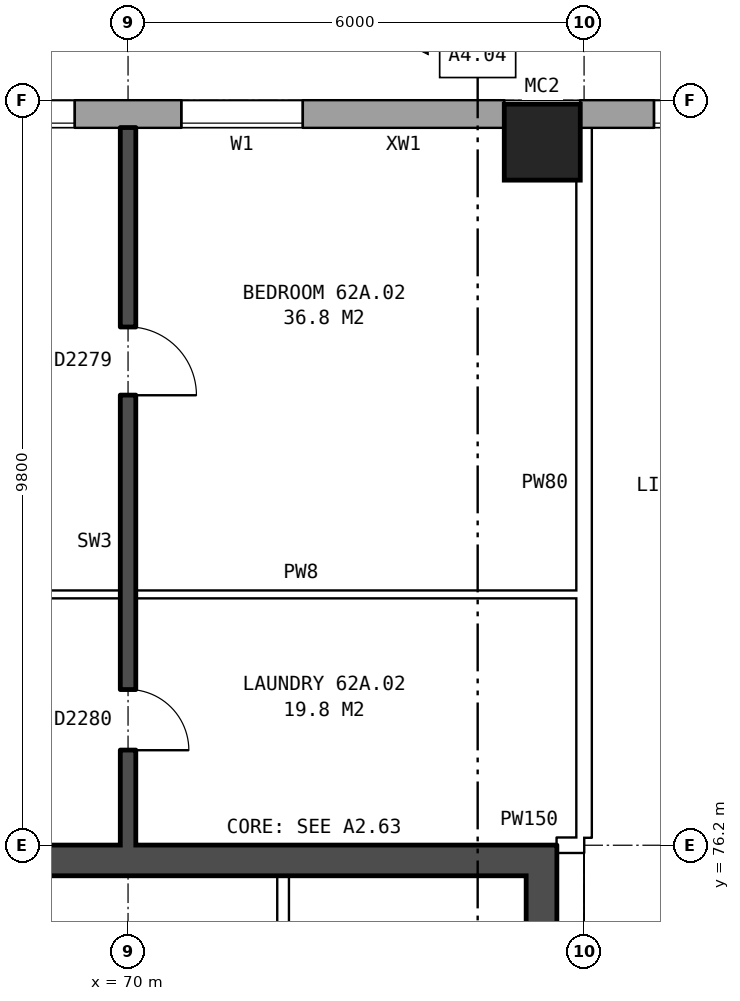
"""IFC4 building model, lengths in metres.
Left out: names, types, materials, properties, quantities, classifications, styles, units other than length and angle.
Written with IfcOpenShell. Run it as: python <this file> out.ifc"""

import sys

from ifc_helpers import new_model, si_unit, direction, frame, frame_2d, origin, origin_2d, place, context, subcontext, project, spatial, rectangle, hollow_rectangle, extrude, element, fill, save


model = new_model("IFC4")
c1 = context("Model", 3, precision=1e-05, world=origin(), true_north=direction((0.0, 1.0)))
c2 = subcontext(c1, "Body", "Model", "MODEL_VIEW")
j1 = project(units=[si_unit("LENGTHUNIT", "METRE"), si_unit("PLANEANGLEUNIT", "RADIAN")], contexts=[c1])
p1 = place(None, origin())
s1 = spatial("IfcSite", under=j1, at=p1, CompositionType="ELEMENT")
p2 = place(p1, origin())
s2 = spatial("IfcBuilding", under=s1, at=p2, CompositionType="ELEMENT")
p3 = place(p2, frame((0.0, 0.0, 221.4)))
s3 = spatial("IfcBuildingStorey", under=s2, at=p3, CompositionType="ELEMENT", Elevation=221.4)
p4 = place(p3, frame((75.45, 85.45, 0.0), z_axis=(0.0, 0.0, 1.0), x_axis=(1.0, 0.0, 0.0)))
e1 = element("IfcColumn", 1, at=p4, inside=s3, PredefinedType="COLUMN", context=c2, shape_type="SweptSolid", body=[
    extrude(hollow_rectangle(XDim=1.0, YDim=1.0, WallThickness=0.055, at=origin_2d()), origin(), (0.0, 0.0, 1.0), 3.1),
])
p5 = place(p3, frame((131.05, 85.82, 0.0), z_axis=(0.0, 0.0, 1.0), x_axis=(-1.0, 0.0, 0.0)))
e2 = element("IfcWall", 2, at=p5, inside=s3, PredefinedType="STANDARD", context=c2, shape_type="SweptSolid", body=[
    extrude(rectangle(XDim=55.1, YDim=0.36, at=frame_2d((27.55, 0.0))), origin(), (0.0, 0.0, 1.0), 2.85),
])
p6 = place(p5, frame((0.969, 0.0, 0.8)))
e3 = element("IfcOpeningElement", 3, at=p6, cuts=e2, PredefinedType="OPENING", context=c2, shape_type="SweptSolid", body=[
    extrude(rectangle(XDim=1.6, YDim=1.8, at=frame_2d((0.8, 0.9))), frame((0.0, 0.19, 0.0), z_axis=(0.0, -1.0, 0.0), x_axis=(1.0, 0.0, 0.0)), (0.0, 0.0, 1.0), 0.38),
])
p7 = place(p5, frame((4.406, 0.0, 0.8)))
e4 = element("IfcOpeningElement", 4, at=p7, cuts=e2, PredefinedType="OPENING", context=c2, shape_type="SweptSolid", body=[
    extrude(rectangle(XDim=1.6, YDim=1.8, at=frame_2d((0.8, 0.9))), frame((0.0, 0.19, 0.0), z_axis=(0.0, -1.0, 0.0), x_axis=(1.0, 0.0, 0.0)), (0.0, 0.0, 1.0), 0.38),
])
p8 = place(p5, frame((7.844, 0.0, 0.8)))
e5 = element("IfcOpeningElement", 5, at=p8, cuts=e2, PredefinedType="OPENING", context=c2, shape_type="SweptSolid", body=[
    extrude(rectangle(XDim=1.6, YDim=1.8, at=frame_2d((0.8, 0.9))), frame((0.0, 0.19, 0.0), z_axis=(0.0, -1.0, 0.0), x_axis=(1.0, 0.0, 0.0)), (0.0, 0.0, 1.0), 0.38),
])
p9 = place(p5, frame((11.281, 0.0, 0.8)))
e6 = element("IfcOpeningElement", 6, at=p9, cuts=e2, PredefinedType="OPENING", context=c2, shape_type="SweptSolid", body=[
    extrude(rectangle(XDim=1.6, YDim=1.8, at=frame_2d((0.8, 0.9))), frame((0.0, 0.19, 0.0), z_axis=(0.0, -1.0, 0.0), x_axis=(1.0, 0.0, 0.0)), (0.0, 0.0, 1.0), 0.38),
])
p10 = place(p5, frame((14.719, 0.0, 0.8)))
e7 = element("IfcOpeningElement", 7, at=p10, cuts=e2, PredefinedType="OPENING", context=c2, shape_type="SweptSolid", body=[
    extrude(rectangle(XDim=1.6, YDim=1.8, at=frame_2d((0.8, 0.9))), frame((0.0, 0.19, 0.0), z_axis=(0.0, -1.0, 0.0), x_axis=(1.0, 0.0, 0.0)), (0.0, 0.0, 1.0), 0.38),
])
p11 = place(p5, frame((18.156, 0.0, 0.8)))
e8 = element("IfcOpeningElement", 8, at=p11, cuts=e2, PredefinedType="OPENING", context=c2, shape_type="SweptSolid", body=[
    extrude(rectangle(XDim=1.6, YDim=1.8, at=frame_2d((0.8, 0.9))), frame((0.0, 0.19, 0.0), z_axis=(0.0, -1.0, 0.0), x_axis=(1.0, 0.0, 0.0)), (0.0, 0.0, 1.0), 0.38),
])
p12 = place(p5, frame((21.594, 0.0, 0.8)))
e9 = element("IfcOpeningElement", 9, at=p12, cuts=e2, PredefinedType="OPENING", context=c2, shape_type="SweptSolid", body=[
    extrude(rectangle(XDim=1.6, YDim=1.8, at=frame_2d((0.8, 0.9))), frame((0.0, 0.19, 0.0), z_axis=(0.0, -1.0, 0.0), x_axis=(1.0, 0.0, 0.0)), (0.0, 0.0, 1.0), 0.38),
])
p13 = place(p5, frame((25.031, 0.0, 0.8)))
e10 = element("IfcOpeningElement", 10, at=p13, cuts=e2, PredefinedType="OPENING", context=c2, shape_type="SweptSolid", body=[
    extrude(rectangle(XDim=1.6, YDim=1.8, at=frame_2d((0.8, 0.9))), frame((0.0, 0.19, 0.0), z_axis=(0.0, -1.0, 0.0), x_axis=(1.0, 0.0, 0.0)), (0.0, 0.0, 1.0), 0.38),
])
p14 = place(p5, frame((28.469, 0.0, 0.8)))
e11 = element("IfcOpeningElement", 11, at=p14, cuts=e2, PredefinedType="OPENING", context=c2, shape_type="SweptSolid", body=[
    extrude(rectangle(XDim=1.6, YDim=1.8, at=frame_2d((0.8, 0.9))), frame((0.0, 0.19, 0.0), z_axis=(0.0, -1.0, 0.0), x_axis=(1.0, 0.0, 0.0)), (0.0, 0.0, 1.0), 0.38),
])
p15 = place(p5, frame((31.906, 0.0, 0.8)))
e12 = element("IfcOpeningElement", 12, at=p15, cuts=e2, PredefinedType="OPENING", context=c2, shape_type="SweptSolid", body=[
    extrude(rectangle(XDim=1.6, YDim=1.8, at=frame_2d((0.8, 0.9))), frame((0.0, 0.19, 0.0), z_axis=(0.0, -1.0, 0.0), x_axis=(1.0, 0.0, 0.0)), (0.0, 0.0, 1.0), 0.38),
])
p16 = place(p5, frame((35.344, 0.0, 0.8)))
e13 = element("IfcOpeningElement", 13, at=p16, cuts=e2, PredefinedType="OPENING", context=c2, shape_type="SweptSolid", body=[
    extrude(rectangle(XDim=1.6, YDim=1.8, at=frame_2d((0.8, 0.9))), frame((0.0, 0.19, 0.0), z_axis=(0.0, -1.0, 0.0), x_axis=(1.0, 0.0, 0.0)), (0.0, 0.0, 1.0), 0.38),
])
p17 = place(p5, frame((38.781, 0.0, 0.8)))
e14 = element("IfcOpeningElement", 14, at=p17, cuts=e2, PredefinedType="OPENING", context=c2, shape_type="SweptSolid", body=[
    extrude(rectangle(XDim=1.6, YDim=1.8, at=frame_2d((0.8, 0.9))), frame((0.0, 0.19, 0.0), z_axis=(0.0, -1.0, 0.0), x_axis=(1.0, 0.0, 0.0)), (0.0, 0.0, 1.0), 0.38),
])
p18 = place(p5, frame((42.219, 0.0, 0.8)))
e15 = element("IfcOpeningElement", 15, at=p18, cuts=e2, PredefinedType="OPENING", context=c2, shape_type="SweptSolid", body=[
    extrude(rectangle(XDim=1.6, YDim=1.8, at=frame_2d((0.8, 0.9))), frame((0.0, 0.19, 0.0), z_axis=(0.0, -1.0, 0.0), x_axis=(1.0, 0.0, 0.0)), (0.0, 0.0, 1.0), 0.38),
])
p19 = place(p5, frame((45.656, 0.0, 0.8)))
e16 = element("IfcOpeningElement", 16, at=p19, cuts=e2, PredefinedType="OPENING", context=c2, shape_type="SweptSolid", body=[
    extrude(rectangle(XDim=1.6, YDim=1.8, at=frame_2d((0.8, 0.9))), frame((0.0, 0.19, 0.0), z_axis=(0.0, -1.0, 0.0), x_axis=(1.0, 0.0, 0.0)), (0.0, 0.0, 1.0), 0.38),
])
p20 = place(p5, frame((49.094, 0.0, 0.8)))
e17 = element("IfcOpeningElement", 17, at=p20, cuts=e2, PredefinedType="OPENING", context=c2, shape_type="SweptSolid", body=[
    extrude(rectangle(XDim=1.6, YDim=1.8, at=frame_2d((0.8, 0.9))), frame((0.0, 0.19, 0.0), z_axis=(0.0, -1.0, 0.0), x_axis=(1.0, 0.0, 0.0)), (0.0, 0.0, 1.0), 0.38),
])
p21 = place(p5, frame((52.531, 0.0, 0.8)))
e18 = element("IfcOpeningElement", 18, at=p21, cuts=e2, PredefinedType="OPENING", context=c2, shape_type="SweptSolid", body=[
    extrude(rectangle(XDim=1.6, YDim=1.8, at=frame_2d((0.8, 0.9))), frame((0.0, 0.19, 0.0), z_axis=(0.0, -1.0, 0.0), x_axis=(1.0, 0.0, 0.0)), (0.0, 0.0, 1.0), 0.38),
])
p22 = place(p3, frame((74.95, 85.82, 0.0), z_axis=(0.0, 0.0, 1.0), x_axis=(-1.0, 0.0, 0.0)))
e19 = element("IfcWall", 19, at=p22, inside=s3, PredefinedType="STANDARD", context=c2, shape_type="SweptSolid", body=[
    extrude(rectangle(XDim=39.875, YDim=0.36, at=frame_2d((19.938, 0.0))), origin(), (0.0, 0.0, 1.0), 2.85),
])
p23 = place(p22, frame((2.65, 0.0, 0.8)))
e20 = element("IfcOpeningElement", 20, at=p23, cuts=e19, PredefinedType="OPENING", context=c2, shape_type="SweptSolid", body=[
    extrude(rectangle(XDim=1.6, YDim=1.8, at=frame_2d((0.8, 0.9))), frame((0.0, 0.19, 0.0), z_axis=(0.0, -1.0, 0.0), x_axis=(1.0, 0.0, 0.0)), (0.0, 0.0, 1.0), 0.38),
])
p24 = place(p22, frame((5.65, 0.0, 0.8)))
e21 = element("IfcOpeningElement", 21, at=p24, cuts=e19, PredefinedType="OPENING", context=c2, shape_type="SweptSolid", body=[
    extrude(rectangle(XDim=1.6, YDim=1.8, at=frame_2d((0.8, 0.9))), frame((0.0, 0.19, 0.0), z_axis=(0.0, -1.0, 0.0), x_axis=(1.0, 0.0, 0.0)), (0.0, 0.0, 1.0), 0.38),
])
p25 = place(p22, frame((8.65, 0.0, 0.8)))
e22 = element("IfcOpeningElement", 22, at=p25, cuts=e19, PredefinedType="OPENING", context=c2, shape_type="SweptSolid", body=[
    extrude(rectangle(XDim=1.6, YDim=1.8, at=frame_2d((0.8, 0.9))), frame((0.0, 0.19, 0.0), z_axis=(0.0, -1.0, 0.0), x_axis=(1.0, 0.0, 0.0)), (0.0, 0.0, 1.0), 0.38),
])
p26 = place(p22, frame((11.15, 0.0, 1.55)))
e23 = element("IfcOpeningElement", 23, at=p26, cuts=e19, PredefinedType="OPENING", context=c2, shape_type="SweptSolid", body=[
    extrude(rectangle(XDim=0.6, YDim=0.9, at=frame_2d((0.3, 0.45))), frame((0.0, 0.19, 0.0), z_axis=(0.0, -1.0, 0.0), x_axis=(1.0, 0.0, 0.0)), (0.0, 0.0, 1.0), 0.38),
])
p27 = place(p22, frame((14.65, 0.0, 0.8)))
e24 = element("IfcOpeningElement", 24, at=p27, cuts=e19, PredefinedType="OPENING", context=c2, shape_type="SweptSolid", body=[
    extrude(rectangle(XDim=1.6, YDim=1.8, at=frame_2d((0.8, 0.9))), frame((0.0, 0.19, 0.0), z_axis=(0.0, -1.0, 0.0), x_axis=(1.0, 0.0, 0.0)), (0.0, 0.0, 1.0), 0.38),
])
p28 = place(p22, frame((17.65, 0.0, 0.8)))
e25 = element("IfcOpeningElement", 25, at=p28, cuts=e19, PredefinedType="OPENING", context=c2, shape_type="SweptSolid", body=[
    extrude(rectangle(XDim=1.6, YDim=1.8, at=frame_2d((0.8, 0.9))), frame((0.0, 0.19, 0.0), z_axis=(0.0, -1.0, 0.0), x_axis=(1.0, 0.0, 0.0)), (0.0, 0.0, 1.0), 0.38),
])
p29 = place(p22, frame((20.65, 0.0, 0.8)))
e26 = element("IfcOpeningElement", 26, at=p29, cuts=e19, PredefinedType="OPENING", context=c2, shape_type="SweptSolid", body=[
    extrude(rectangle(XDim=1.6, YDim=1.8, at=frame_2d((0.8, 0.9))), frame((0.0, 0.19, 0.0), z_axis=(0.0, -1.0, 0.0), x_axis=(1.0, 0.0, 0.0)), (0.0, 0.0, 1.0), 0.38),
])
p30 = place(p22, frame((23.65, 0.0, 0.8)))
e27 = element("IfcOpeningElement", 27, at=p30, cuts=e19, PredefinedType="OPENING", context=c2, shape_type="SweptSolid", body=[
    extrude(rectangle(XDim=1.6, YDim=1.8, at=frame_2d((0.8, 0.9))), frame((0.0, 0.19, 0.0), z_axis=(0.0, -1.0, 0.0), x_axis=(1.0, 0.0, 0.0)), (0.0, 0.0, 1.0), 0.38),
])
p31 = place(p22, frame((26.65, 0.0, 0.8)))
e28 = element("IfcOpeningElement", 28, at=p31, cuts=e19, PredefinedType="OPENING", context=c2, shape_type="SweptSolid", body=[
    extrude(rectangle(XDim=1.6, YDim=1.8, at=frame_2d((0.8, 0.9))), frame((0.0, 0.19, 0.0), z_axis=(0.0, -1.0, 0.0), x_axis=(1.0, 0.0, 0.0)), (0.0, 0.0, 1.0), 0.38),
])
p32 = place(p22, frame((30.05, 0.0, 1.7)))
e29 = element("IfcOpeningElement", 29, at=p32, cuts=e19, PredefinedType="OPENING", context=c2, shape_type="SweptSolid", body=[
    extrude(rectangle(XDim=0.6, YDim=0.9, at=frame_2d((0.3, 0.45))), frame((0.0, 0.19, 0.0), z_axis=(0.0, -1.0, 0.0), x_axis=(1.0, 0.0, 0.0)), (0.0, 0.0, 1.0), 0.38),
])
p33 = place(p22, frame((32.65, 0.0, 0.8)))
e30 = element("IfcOpeningElement", 30, at=p33, cuts=e19, PredefinedType="OPENING", context=c2, shape_type="SweptSolid", body=[
    extrude(rectangle(XDim=1.6, YDim=1.8, at=frame_2d((0.8, 0.9))), frame((0.0, 0.19, 0.0), z_axis=(0.0, -1.0, 0.0), x_axis=(1.0, 0.0, 0.0)), (0.0, 0.0, 1.0), 0.38),
])
p34 = place(p22, frame((35.65, 0.0, 0.8)))
e31 = element("IfcOpeningElement", 31, at=p34, cuts=e19, PredefinedType="OPENING", context=c2, shape_type="SweptSolid", body=[
    extrude(rectangle(XDim=1.6, YDim=1.8, at=frame_2d((0.8, 0.9))), frame((0.0, 0.19, 0.0), z_axis=(0.0, -1.0, 0.0), x_axis=(1.0, 0.0, 0.0)), (0.0, 0.0, 1.0), 0.38),
])
p35 = place(p22, frame((13.0, 0.0, 0.15)))
e32 = element("IfcOpeningElement", 32, at=p35, cuts=e19, PredefinedType="OPENING", context=c2, shape_type="SweptSolid", body=[
    extrude(rectangle(XDim=0.8, YDim=1.5, at=frame_2d((0.4, 0.75))), frame((0.0, 0.19, 0.0), z_axis=(0.0, -1.0, 0.0), x_axis=(1.0, 0.0, 0.0)), (0.0, 0.0, 1.0), 0.38),
])
p36 = place(p22, frame((30.95, 0.0, 0.8)))
e33 = element("IfcOpeningElement", 33, at=p36, cuts=e19, PredefinedType="OPENING", context=c2, shape_type="SweptSolid", body=[
    extrude(rectangle(XDim=1.4, YDim=1.8, at=frame_2d((0.7, 0.9))), frame((0.0, 0.19, 0.0), z_axis=(0.0, -1.0, 0.0), x_axis=(1.0, 0.0, 0.0)), (0.0, 0.0, 1.0), 0.38),
])
p37 = place(p3, frame((75.44, 63.8, 0.0), z_axis=(0.0, 0.0, 1.0), x_axis=(0.0, 1.0, 0.0)))
e34 = element("IfcWall", 34, at=p37, inside=s3, PredefinedType="SHEAR", context=c2, shape_type="SweptSolid", body=[
    extrude(rectangle(XDim=12.4, YDim=0.4, at=frame_2d((6.2, 0.0))), origin(), (0.0, 0.0, 1.0), 2.85),
])
p38 = place(p37, frame((9.8, 0.0, 0.0)))
e35 = element("IfcOpeningElement", 35, at=p38, cuts=e34, PredefinedType="OPENING", context=c2, shape_type="SweptSolid", body=[
    extrude(rectangle(XDim=1.1, YDim=2.1, at=frame_2d((0.55, 1.05))), frame((0.0, 0.21, 0.0), z_axis=(0.0, -1.0, 0.0), x_axis=(1.0, 0.0, 0.0)), (0.0, 0.0, 1.0), 0.42),
])
p39 = place(p3, frame((67.04, 76.0, 0.0), z_axis=(0.0, 0.0, 1.0), x_axis=(1.0, 0.0, 0.0)))
e36 = element("IfcWall", 36, at=p39, inside=s3, PredefinedType="SHEAR", context=c2, shape_type="SweptSolid", body=[
    extrude(rectangle(XDim=8.2, YDim=0.4, at=frame_2d((4.1, 0.0))), origin(), (0.0, 0.0, 1.0), 2.85),
])
p40 = place(p3, frame((72.04, 73.45, 0.0), z_axis=(0.0, 0.0, 1.0), x_axis=(0.0, 1.0, 0.0)))
e37 = element("IfcWall", 37, at=p40, inside=s3, PredefinedType="PARTITIONING", context=c2, shape_type="SweptSolid", body=[
    extrude(rectangle(XDim=2.35, YDim=0.15, at=frame_2d((1.175, 0.0))), origin(), (0.0, 0.0, 1.0), 2.85),
])
p41 = place(p40, frame((0.75, 0.0, 0.0)))
e38 = element("IfcOpeningElement", 38, at=p41, cuts=e37, PredefinedType="OPENING", context=c2, shape_type="SweptSolid", body=[
    extrude(rectangle(XDim=0.85, YDim=2.1, at=frame_2d((0.425, 1.05))), frame((0.0, 0.085, 0.0), z_axis=(0.0, -1.0, 0.0), x_axis=(1.0, 0.0, 0.0)), (0.0, 0.0, 1.0), 0.17),
])
p42 = place(p3, frame((75.64, 76.2, 0.0), z_axis=(0.0, 0.0, 1.0), x_axis=(1.0, 0.0, 0.0)))
e39 = element("IfcWall", 39, at=p42, inside=s3, PredefinedType="PARTITIONING", context=c2, shape_type="SweptSolid", body=[
    extrude(rectangle(XDim=0.36, YDim=0.2, at=frame_2d((0.18, 0.0))), origin(), (0.0, 0.0, 1.0), 2.85),
])
p43 = place(p3, frame((64.1, 79.5, 0.0), z_axis=(0.0, 0.0, 1.0), x_axis=(1.0, 0.0, 0.0)))
e40 = element("IfcWall", 40, at=p43, inside=s3, PredefinedType="PARTITIONING", context=c2, shape_type="SweptSolid", body=[
    extrude(rectangle(XDim=11.8, YDim=0.1, at=frame_2d((5.9, 0.0))), origin(), (0.0, 0.0, 1.0), 2.85),
])
p44 = place(p43, frame((3.65, 0.0, 0.0)))
e41 = element("IfcOpeningElement", 41, at=p44, cuts=e40, PredefinedType="OPENING", context=c2, shape_type="SweptSolid", body=[
    extrude(rectangle(XDim=0.9, YDim=2.1, at=frame_2d((0.45, 1.05))), frame((0.0, 0.06, 0.0), z_axis=(0.0, -1.0, 0.0), x_axis=(1.0, 0.0, 0.0)), (0.0, 0.0, 1.0), 0.12),
])
p45 = place(p43, frame((0.7, 0.0, 0.0)))
e42 = element("IfcOpeningElement", 42, at=p45, cuts=e40, PredefinedType="OPENING", context=c2, shape_type="SweptSolid", body=[
    extrude(rectangle(XDim=0.9, YDim=2.1, at=frame_2d((0.45, 1.05))), frame((0.0, 0.06, 0.0), z_axis=(0.0, -1.0, 0.0), x_axis=(1.0, 0.0, 0.0)), (0.0, 0.0, 1.0), 0.12),
])
p46 = place(p3, frame((70.0, 76.2, 0.0), z_axis=(0.0, 0.0, 1.0), x_axis=(0.0, 1.0, 0.0)))
e43 = element("IfcWall", 43, at=p46, inside=s3, PredefinedType="SOLIDWALL", context=c2, shape_type="SweptSolid", body=[
    extrude(rectangle(XDim=9.44, YDim=0.2, at=frame_2d((4.72, 0.0))), origin(), (0.0, 0.0, 1.0), 2.85),
])
p47 = place(p46, frame((5.92, 0.0, 0.0)))
e44 = element("IfcOpeningElement", 44, at=p47, cuts=e43, PredefinedType="OPENING", context=c2, shape_type="SweptSolid", body=[
    extrude(rectangle(XDim=0.9, YDim=2.1, at=frame_2d((0.45, 1.05))), frame((0.0, 0.11, 0.0), z_axis=(0.0, -1.0, 0.0), x_axis=(1.0, 0.0, 0.0)), (0.0, 0.0, 1.0), 0.22),
])
p48 = place(p46, frame((1.25, 0.0, 0.0)))
e45 = element("IfcOpeningElement", 45, at=p48, cuts=e43, PredefinedType="OPENING", context=c2, shape_type="SweptSolid", body=[
    extrude(rectangle(XDim=0.8, YDim=2.1, at=frame_2d((0.4, 1.05))), frame((0.0, 0.11, 0.0), z_axis=(0.0, -1.0, 0.0), x_axis=(1.0, 0.0, 0.0)), (0.0, 0.0, 1.0), 0.22),
])
p49 = place(p3, frame((76.0, 76.3, 0.0), z_axis=(0.0, 0.0, 1.0), x_axis=(0.0, 1.0, 0.0)))
e46 = element("IfcWall", 46, at=p49, inside=s3, PredefinedType="PARTITIONING", context=c2, shape_type="SweptSolid", body=[
    extrude(rectangle(XDim=9.34, YDim=0.2, at=frame_2d((4.67, 0.0))), origin(), (0.0, 0.0, 1.0), 2.85),
])
p50 = place(p21, origin())
e47 = element("IfcWindow", 47, at=p50, inside=s3, PartitioningType="SINGLE_PANEL", PredefinedType="WINDOW", context=c2, shape_type="SweptSolid", body=[
    extrude(rectangle(XDim=1.6, YDim=1.8, at=frame_2d((0.8, 0.9))), frame((0.0, 0.15, 0.0), z_axis=(0.0, -1.0, 0.0), x_axis=(1.0, 0.0, 0.0)), (0.0, 0.0, 1.0), 0.06),
])
fill(e18, e47)
p51 = place(p23, origin())
e48 = element("IfcWindow", 48, at=p51, inside=s3, PartitioningType="SINGLE_PANEL", PredefinedType="WINDOW", context=c2, shape_type="SweptSolid", body=[
    extrude(rectangle(XDim=1.6, YDim=1.8, at=frame_2d((0.8, 0.9))), frame((0.0, 0.15, 0.0), z_axis=(0.0, -1.0, 0.0), x_axis=(1.0, 0.0, 0.0)), (0.0, 0.0, 1.0), 0.06),
])
fill(e20, e48)
p52 = place(p24, origin())
e49 = element("IfcWindow", 49, at=p52, inside=s3, PartitioningType="SINGLE_PANEL", PredefinedType="WINDOW", context=c2, shape_type="SweptSolid", body=[
    extrude(rectangle(XDim=1.6, YDim=1.8, at=frame_2d((0.8, 0.9))), frame((0.0, 0.15, 0.0), z_axis=(0.0, -1.0, 0.0), x_axis=(1.0, 0.0, 0.0)), (0.0, 0.0, 1.0), 0.06),
])
fill(e21, e49)
p53 = place(p47, frame((0.9, 0.0, 0.0), z_axis=(0.0, 0.0, 1.0), x_axis=(-1.0, 0.0, 0.0)))
e50 = element("IfcDoor", 50, at=p53, inside=s3, OperationType="SINGLE_SWING_RIGHT", PredefinedType="DOOR", context=c2, shape_type="SweptSolid", body=[
    extrude(rectangle(XDim=0.9, YDim=2.1, at=frame_2d((0.45, 1.05))), frame((0.0, 0.025, 0.0), z_axis=(0.0, -1.0, 0.0), x_axis=(1.0, 0.0, 0.0)), (0.0, 0.0, 1.0), 0.05),
])
fill(e44, e50)
p54 = place(p48, frame((0.8, 0.0, 0.0), z_axis=(0.0, 0.0, 1.0), x_axis=(-1.0, 0.0, 0.0)))
e51 = element("IfcDoor", 51, at=p54, inside=s3, OperationType="SINGLE_SWING_RIGHT", PredefinedType="DOOR", context=c2, shape_type="SweptSolid", body=[
    extrude(rectangle(XDim=0.8, YDim=2.1, at=frame_2d((0.4, 1.05))), frame((0.0, 0.025, 0.0), z_axis=(0.0, -1.0, 0.0), x_axis=(1.0, 0.0, 0.0)), (0.0, 0.0, 1.0), 0.05),
])
fill(e45, e51)
save(model, sys.argv[1])
